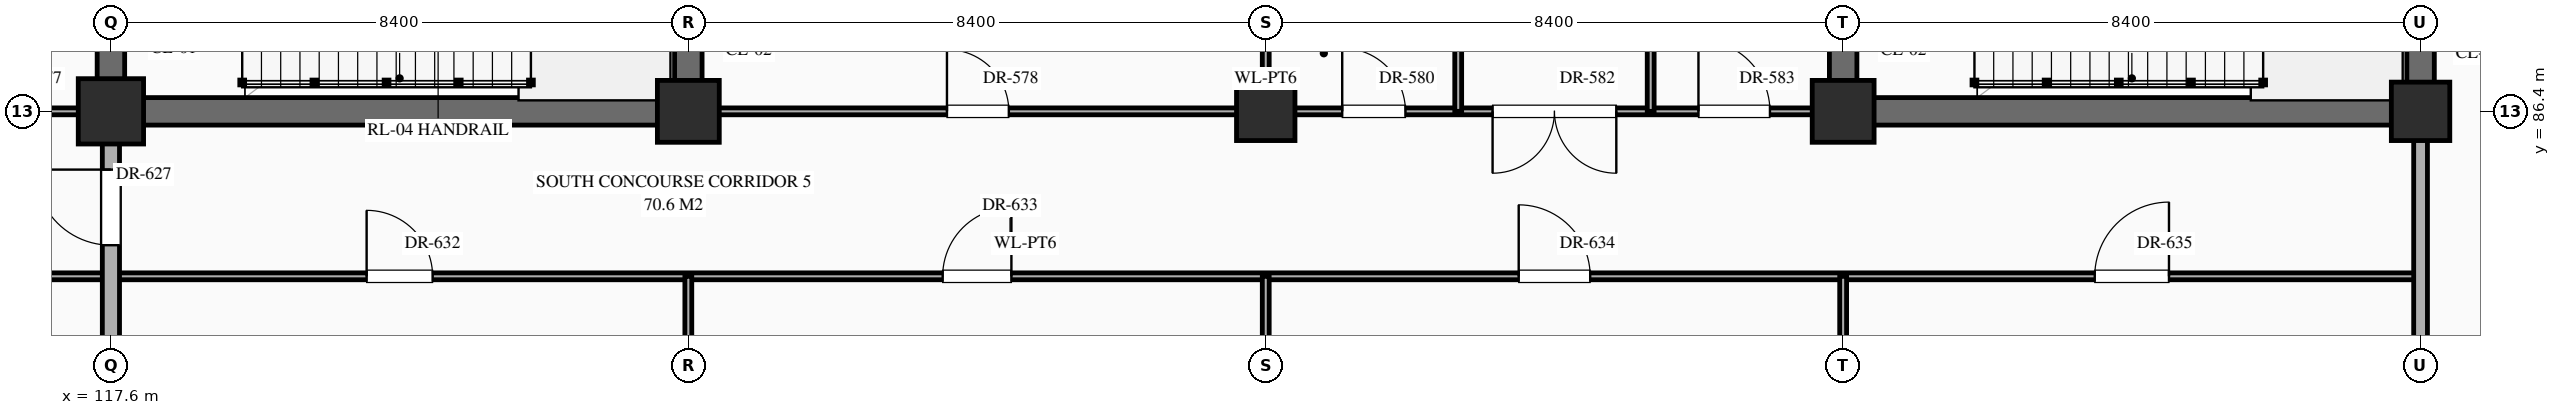
"""IFC4 building model, lengths in metres.
Left out: names, types, materials, properties, quantities, classifications, styles, units other than length and angle.
Written with IfcOpenShell. Run it as: python <this file> out.ifc"""

import sys

from ifc_helpers import new_model, si_unit, direction, frame, frame_2d, origin, origin_2d, place, context, subcontext, project, spatial, rectangle, extrude, element, fill, save


model = new_model("IFC4")
c1 = context("Model", 3, precision=1e-05, world=origin(), true_north=direction((0.0, 1.0)))
c2 = subcontext(c1, "Body", "Model", "MODEL_VIEW")
j1 = project(units=[si_unit("LENGTHUNIT", "METRE"), si_unit("PLANEANGLEUNIT", "RADIAN")], contexts=[c1])
p1 = place(None, origin())
s1 = spatial("IfcSite", under=j1, at=p1, CompositionType="ELEMENT")
p2 = place(p1, origin())
s2 = spatial("IfcBuilding", under=s1, at=p2, CompositionType="ELEMENT")
p3 = place(p2, frame((0.0, 0.0, -5.4)))
s3 = spatial("IfcBuildingStorey", under=s2, at=p3, CompositionType="ELEMENT", Elevation=-5.4)
p4 = place(p3, frame((117.6, 86.4, 0.0), z_axis=(0.0, 0.0, 1.0), x_axis=(1.0, 0.0, 0.0)))
e1 = element("IfcColumn", 1, at=p4, inside=s3, PredefinedType="COLUMN", context=c2, shape_type="SweptSolid", body=[
    extrude(rectangle(XDim=0.95, YDim=0.95, at=origin_2d()), origin(), (0.0, 0.0, 1.0), 5.4),
])
p5 = place(p3, frame((126.0, 86.4, 0.0), z_axis=(0.0, 0.0, 1.0), x_axis=(1.0, 0.0, 0.0)))
e2 = element("IfcColumn", 2, at=p5, inside=s3, PredefinedType="COLUMN", context=c2, shape_type="SweptSolid", body=[
    extrude(rectangle(XDim=0.9, YDim=0.9, at=origin_2d()), origin(), (0.0, 0.0, 1.0), 5.4),
])
p6 = place(p3, frame((134.4, 86.4, 0.0), z_axis=(0.0, 0.0, 1.0), x_axis=(1.0, 0.0, 0.0)))
e3 = element("IfcColumn", 3, at=p6, inside=s3, PredefinedType="COLUMN", context=c2, shape_type="SweptSolid", body=[
    extrude(rectangle(XDim=0.85, YDim=0.85, at=origin_2d()), origin(), (0.0, 0.0, 1.0), 5.4),
])
p7 = place(p3, frame((142.8, 86.4, 0.0), z_axis=(0.0, 0.0, 1.0), x_axis=(1.0, 0.0, 0.0)))
e4 = element("IfcColumn", 4, at=p7, inside=s3, PredefinedType="COLUMN", context=c2, shape_type="SweptSolid", body=[
    extrude(rectangle(XDim=0.9, YDim=0.9, at=origin_2d()), origin(), (0.0, 0.0, 1.0), 5.4),
])
p8 = place(p3, frame((151.2, 86.4, 0.0), z_axis=(0.0, 0.0, 1.0), x_axis=(1.0, 0.0, 0.0)))
e5 = element("IfcColumn", 5, at=p8, inside=s3, PredefinedType="COLUMN", context=c2, shape_type="SweptSolid", body=[
    extrude(rectangle(XDim=0.85, YDim=0.85, at=origin_2d()), origin(), (0.0, 0.0, 1.0), 5.4),
])
p9 = place(p3, frame((33.6, 84.0, 0.0), z_axis=(0.0, 0.0, 1.0), x_axis=(1.0, 0.0, 0.0)))
e6 = element("IfcWall", 6, at=p9, inside=s3, PredefinedType="STANDARD", context=c2, shape_type="SweptSolid", body=[
    extrude(rectangle(XDim=117.6, YDim=0.1, at=frame_2d((58.8, 0.0))), origin(), (0.0, 0.0, 1.0), 5.1),
])
p10 = place(p9, frame((3.66, 0.0, 0.0)))
e7 = element("IfcOpeningElement", 7, at=p10, cuts=e6, PredefinedType="OPENING", context=c2, shape_type="SweptSolid", body=[
    extrude(rectangle(XDim=1.08, YDim=2.25, at=frame_2d((0.54, 1.125))), frame((0.0, 0.062, 0.0), z_axis=(0.0, -1.0, 0.0), x_axis=(1.0, 0.0, 0.0)), (0.0, 0.0, 1.0), 0.124),
])
p11 = place(p9, frame((12.04, 0.0, 0.0)))
e8 = element("IfcOpeningElement", 8, at=p11, cuts=e6, PredefinedType="OPENING", context=c2, shape_type="SweptSolid", body=[
    extrude(rectangle(XDim=1.12, YDim=2.25, at=frame_2d((0.56, 1.125))), frame((0.0, 0.062, 0.0), z_axis=(0.0, -1.0, 0.0), x_axis=(1.0, 0.0, 0.0)), (0.0, 0.0, 1.0), 0.124),
])
p12 = place(p9, frame((20.4, 0.0, 0.0)))
e9 = element("IfcOpeningElement", 9, at=p12, cuts=e6, PredefinedType="OPENING", context=c2, shape_type="SweptSolid", body=[
    extrude(rectangle(XDim=1.2, YDim=2.35, at=frame_2d((0.6, 1.175))), frame((0.0, 0.062, 0.0), z_axis=(0.0, -1.0, 0.0), x_axis=(1.0, 0.0, 0.0)), (0.0, 0.0, 1.0), 0.124),
])
p13 = place(p9, frame((28.78, 0.0, 0.0)))
e10 = element("IfcOpeningElement", 10, at=p13, cuts=e6, PredefinedType="OPENING", context=c2, shape_type="SweptSolid", body=[
    extrude(rectangle(XDim=1.24, YDim=2.3, at=frame_2d((0.62, 1.15))), frame((0.0, 0.062, 0.0), z_axis=(0.0, -1.0, 0.0), x_axis=(1.0, 0.0, 0.0)), (0.0, 0.0, 1.0), 0.124),
])
p14 = place(p9, frame((37.16, 0.0, 0.0)))
e11 = element("IfcOpeningElement", 11, at=p14, cuts=e6, PredefinedType="OPENING", context=c2, shape_type="SweptSolid", body=[
    extrude(rectangle(XDim=1.28, YDim=2.35, at=frame_2d((0.64, 1.175))), frame((0.0, 0.062, 0.0), z_axis=(0.0, -1.0, 0.0), x_axis=(1.0, 0.0, 0.0)), (0.0, 0.0, 1.0), 0.124),
])
p15 = place(p9, frame((42.93, 0.0, 0.0)))
e12 = element("IfcOpeningElement", 12, at=p15, cuts=e6, PredefinedType="OPENING", context=c2, shape_type="SweptSolid", body=[
    extrude(rectangle(XDim=0.94, YDim=2.3, at=frame_2d((0.47, 1.15))), frame((0.0, 0.062, 0.0), z_axis=(0.0, -1.0, 0.0), x_axis=(1.0, 0.0, 0.0)), (0.0, 0.0, 1.0), 0.124),
])
p16 = place(p9, frame((45.71, 0.0, 0.0)))
e13 = element("IfcOpeningElement", 13, at=p16, cuts=e6, PredefinedType="OPENING", context=c2, shape_type="SweptSolid", body=[
    extrude(rectangle(XDim=0.98, YDim=2.35, at=frame_2d((0.49, 1.175))), frame((0.0, 0.062, 0.0), z_axis=(0.0, -1.0, 0.0), x_axis=(1.0, 0.0, 0.0)), (0.0, 0.0, 1.0), 0.124),
])
p17 = place(p9, frame((48.49, 0.0, 0.0)))
e14 = element("IfcOpeningElement", 14, at=p17, cuts=e6, PredefinedType="OPENING", context=c2, shape_type="SweptSolid", body=[
    extrude(rectangle(XDim=1.02, YDim=2.4, at=frame_2d((0.51, 1.2))), frame((0.0, 0.062, 0.0), z_axis=(0.0, -1.0, 0.0), x_axis=(1.0, 0.0, 0.0)), (0.0, 0.0, 1.0), 0.124),
])
p18 = place(p9, frame((54.03, 0.0, 0.0)))
e15 = element("IfcOpeningElement", 15, at=p18, cuts=e6, PredefinedType="OPENING", context=c2, shape_type="SweptSolid", body=[
    extrude(rectangle(XDim=1.14, YDim=2.4, at=frame_2d((0.57, 1.2))), frame((0.0, 0.062, 0.0), z_axis=(0.0, -1.0, 0.0), x_axis=(1.0, 0.0, 0.0)), (0.0, 0.0, 1.0), 0.124),
])
p19 = place(p9, frame((62.55, 0.0, 0.0)))
e16 = element("IfcOpeningElement", 16, at=p19, cuts=e6, PredefinedType="OPENING", context=c2, shape_type="SweptSolid", body=[
    extrude(rectangle(XDim=0.9, YDim=2.15, at=frame_2d((0.45, 1.075))), frame((0.0, 0.062, 0.0), z_axis=(0.0, -1.0, 0.0), x_axis=(1.0, 0.0, 0.0)), (0.0, 0.0, 1.0), 0.124),
])
p20 = place(p9, frame((70.97, 0.0, 0.0)))
e17 = element("IfcOpeningElement", 17, at=p20, cuts=e6, PredefinedType="OPENING", context=c2, shape_type="SweptSolid", body=[
    extrude(rectangle(XDim=0.86, YDim=2.1, at=frame_2d((0.43, 1.05))), frame((0.0, 0.062, 0.0), z_axis=(0.0, -1.0, 0.0), x_axis=(1.0, 0.0, 0.0)), (0.0, 0.0, 1.0), 0.124),
])
p21 = place(p9, frame((79.34, 0.0, 0.0)))
e18 = element("IfcOpeningElement", 18, at=p21, cuts=e6, PredefinedType="OPENING", context=c2, shape_type="SweptSolid", body=[
    extrude(rectangle(XDim=0.92, YDim=2.15, at=frame_2d((0.46, 1.075))), frame((0.0, 0.062, 0.0), z_axis=(0.0, -1.0, 0.0), x_axis=(1.0, 0.0, 0.0)), (0.0, 0.0, 1.0), 0.124),
])
p22 = place(p9, frame((87.72, 0.0, 0.0)))
e19 = element("IfcOpeningElement", 19, at=p22, cuts=e6, PredefinedType="OPENING", context=c2, shape_type="SweptSolid", body=[
    extrude(rectangle(XDim=0.96, YDim=2.2, at=frame_2d((0.48, 1.1))), frame((0.0, 0.062, 0.0), z_axis=(0.0, -1.0, 0.0), x_axis=(1.0, 0.0, 0.0)), (0.0, 0.0, 1.0), 0.124),
])
p23 = place(p9, frame((96.1, 0.0, 0.0)))
e20 = element("IfcOpeningElement", 20, at=p23, cuts=e6, PredefinedType="OPENING", context=c2, shape_type="SweptSolid", body=[
    extrude(rectangle(XDim=1.0, YDim=2.25, at=frame_2d((0.5, 1.125))), frame((0.0, 0.062, 0.0), z_axis=(0.0, -1.0, 0.0), x_axis=(1.0, 0.0, 0.0)), (0.0, 0.0, 1.0), 0.124),
])
p24 = place(p9, frame((104.48, 0.0, 0.0)))
e21 = element("IfcOpeningElement", 21, at=p24, cuts=e6, PredefinedType="OPENING", context=c2, shape_type="SweptSolid", body=[
    extrude(rectangle(XDim=1.04, YDim=2.2, at=frame_2d((0.52, 1.1))), frame((0.0, 0.062, 0.0), z_axis=(0.0, -1.0, 0.0), x_axis=(1.0, 0.0, 0.0)), (0.0, 0.0, 1.0), 0.124),
])
p25 = place(p9, frame((112.86, 0.0, 0.0)))
e22 = element("IfcOpeningElement", 22, at=p25, cuts=e6, PredefinedType="OPENING", context=c2, shape_type="SweptSolid", body=[
    extrude(rectangle(XDim=1.08, YDim=2.25, at=frame_2d((0.54, 1.125))), frame((0.0, 0.062, 0.0), z_axis=(0.0, -1.0, 0.0), x_axis=(1.0, 0.0, 0.0)), (0.0, 0.0, 1.0), 0.124),
])
p26 = place(p3, frame((109.2, 86.4, 0.0), z_axis=(0.0, 0.0, 1.0), x_axis=(1.0, 0.0, 0.0)))
e23 = element("IfcWall", 23, at=p26, inside=s3, PredefinedType="STANDARD", context=c2, shape_type="SweptSolid", body=[
    extrude(rectangle(XDim=8.4, YDim=0.1, at=frame_2d((4.2, 0.0))), origin(), (0.0, 0.0, 1.0), 4.25),
])
p27 = place(p26, frame((1.107, 0.0, 0.0)))
e24 = element("IfcOpeningElement", 24, at=p27, cuts=e23, PredefinedType="OPENING", context=c2, shape_type="SweptSolid", body=[
    extrude(rectangle(XDim=0.98, YDim=2.35, at=frame_2d((0.49, 1.175))), frame((0.0, 0.062, 0.0), z_axis=(0.0, -1.0, 0.0), x_axis=(1.0, 0.0, 0.0)), (0.0, 0.0, 1.0), 0.124),
])
p28 = place(p26, frame((3.67, 0.0, 0.0)))
e25 = element("IfcOpeningElement", 25, at=p28, cuts=e23, PredefinedType="OPENING", context=c2, shape_type="SweptSolid", body=[
    extrude(rectangle(XDim=1.06, YDim=2.4, at=frame_2d((0.53, 1.2))), frame((0.0, 0.062, 0.0), z_axis=(0.0, -1.0, 0.0), x_axis=(1.0, 0.0, 0.0)), (0.0, 0.0, 1.0), 0.124),
])
p29 = place(p26, frame((6.232, 0.0, 0.0)))
e26 = element("IfcOpeningElement", 26, at=p29, cuts=e23, PredefinedType="OPENING", context=c2, shape_type="SweptSolid", body=[
    extrude(rectangle(XDim=1.14, YDim=2.4, at=frame_2d((0.57, 1.2))), frame((0.0, 0.062, 0.0), z_axis=(0.0, -1.0, 0.0), x_axis=(1.0, 0.0, 0.0)), (0.0, 0.0, 1.0), 0.124),
])
p30 = place(p3, frame((117.6, 86.4, 0.0), z_axis=(0.0, 0.0, 1.0), x_axis=(1.0, 0.0, 0.0)))
e27 = element("IfcWall", 27, at=p30, inside=s3, PredefinedType="SHEAR", context=c2, shape_type="SweptSolid", body=[
    extrude(rectangle(XDim=8.4, YDim=0.4, at=frame_2d((4.2, 0.0))), origin(), (0.0, 0.0, 1.0), 5.1),
])
p31 = place(p3, frame((126.0, 86.4, 0.0), z_axis=(0.0, 0.0, 1.0), x_axis=(1.0, 0.0, 0.0)))
e28 = element("IfcWall", 28, at=p31, inside=s3, PredefinedType="STANDARD", context=c2, shape_type="SweptSolid", body=[
    extrude(rectangle(XDim=16.8, YDim=0.1, at=frame_2d((8.4, 0.0))), origin(), (0.0, 0.0, 1.0), 4.25),
])
p32 = place(p31, frame((3.762, 0.0, 0.0)))
e29 = element("IfcOpeningElement", 29, at=p32, cuts=e28, PredefinedType="OPENING", context=c2, shape_type="SweptSolid", body=[
    extrude(rectangle(XDim=0.9, YDim=2.15, at=frame_2d((0.45, 1.075))), frame((0.0, 0.062, 0.0), z_axis=(0.0, -1.0, 0.0), x_axis=(1.0, 0.0, 0.0)), (0.0, 0.0, 1.0), 0.124),
])
p33 = place(p31, frame((9.512, 0.0, 0.0)))
e30 = element("IfcOpeningElement", 30, at=p33, cuts=e28, PredefinedType="OPENING", context=c2, shape_type="SweptSolid", body=[
    extrude(rectangle(XDim=0.92, YDim=2.15, at=frame_2d((0.46, 1.075))), frame((0.0, 0.062, 0.0), z_axis=(0.0, -1.0, 0.0), x_axis=(1.0, 0.0, 0.0)), (0.0, 0.0, 1.0), 0.124),
])
p34 = place(p31, frame((11.7, 0.0, 0.0)))
e31 = element("IfcOpeningElement", 31, at=p34, cuts=e28, PredefinedType="OPENING", context=c2, shape_type="SweptSolid", body=[
    extrude(rectangle(XDim=1.8, YDim=2.5, at=frame_2d((0.9, 1.25))), frame((0.0, 0.062, 0.0), z_axis=(0.0, -1.0, 0.0), x_axis=(1.0, 0.0, 0.0)), (0.0, 0.0, 1.0), 0.124),
])
p35 = place(p31, frame((14.695, 0.0, 0.0)))
e32 = element("IfcOpeningElement", 32, at=p35, cuts=e28, PredefinedType="OPENING", context=c2, shape_type="SweptSolid", body=[
    extrude(rectangle(XDim=1.04, YDim=2.2, at=frame_2d((0.52, 1.1))), frame((0.0, 0.062, 0.0), z_axis=(0.0, -1.0, 0.0), x_axis=(1.0, 0.0, 0.0)), (0.0, 0.0, 1.0), 0.124),
])
p36 = place(p3, frame((142.8, 86.4, 0.0), z_axis=(0.0, 0.0, 1.0), x_axis=(1.0, 0.0, 0.0)))
e33 = element("IfcWall", 33, at=p36, inside=s3, PredefinedType="SHEAR", context=c2, shape_type="SweptSolid", body=[
    extrude(rectangle(XDim=8.4, YDim=0.4, at=frame_2d((4.2, 0.0))), origin(), (0.0, 0.0, 1.0), 5.1),
])
p37 = place(p3, frame((117.6, 79.2, 0.0), z_axis=(0.0, 0.0, 1.0), x_axis=(0.0, 1.0, 0.0)))
e34 = element("IfcWall", 34, at=p37, inside=s3, PredefinedType="STANDARD", context=c2, shape_type="SweptSolid", body=[
    extrude(rectangle(XDim=7.2, YDim=0.25, at=frame_2d((3.6, 0.0))), origin(), (0.0, 0.0, 1.0), 4.35),
])
p38 = place(p37, frame((5.252, 0.0, 0.0)))
e35 = element("IfcOpeningElement", 35, at=p38, cuts=e34, PredefinedType="OPENING", context=c2, shape_type="SweptSolid", body=[
    extrude(rectangle(XDim=1.1, YDim=2.2, at=frame_2d((0.55, 1.1))), frame((0.0, 0.137, 0.0), z_axis=(0.0, -1.0, 0.0), x_axis=(1.0, 0.0, 0.0)), (0.0, 0.0, 1.0), 0.274),
])
p39 = place(p3, frame((117.6, 86.4, 0.0), z_axis=(0.0, 0.0, 1.0), x_axis=(0.0, 1.0, 0.0)))
e36 = element("IfcWall", 36, at=p39, inside=s3, PredefinedType="SHEAR", context=c2, shape_type="SweptSolid", body=[
    extrude(rectangle(XDim=4.8, YDim=0.4, at=frame_2d((2.4, 0.0))), origin(), (0.0, 0.0, 1.0), 5.1),
])
p40 = place(p3, frame((126.0, 79.2, 0.0), z_axis=(0.0, 0.0, 1.0), x_axis=(0.0, 1.0, 0.0)))
e37 = element("IfcWall", 37, at=p40, inside=s3, PredefinedType="STANDARD", context=c2, shape_type="SweptSolid", body=[
    extrude(rectangle(XDim=4.8, YDim=0.1, at=frame_2d((2.4, 0.0))), origin(), (0.0, 0.0, 1.0), 4.35),
])
p41 = place(p3, frame((126.0, 86.4, 0.0), z_axis=(0.0, 0.0, 1.0), x_axis=(0.0, 1.0, 0.0)))
e38 = element("IfcWall", 38, at=p41, inside=s3, PredefinedType="SHEAR", context=c2, shape_type="SweptSolid", body=[
    extrude(rectangle(XDim=4.8, YDim=0.4, at=frame_2d((2.4, 0.0))), origin(), (0.0, 0.0, 1.0), 5.1),
])
p42 = place(p3, frame((134.4, 79.2, 0.0), z_axis=(0.0, 0.0, 1.0), x_axis=(0.0, 1.0, 0.0)))
e39 = element("IfcWall", 39, at=p42, inside=s3, PredefinedType="STANDARD", context=c2, shape_type="SweptSolid", body=[
    extrude(rectangle(XDim=4.8, YDim=0.1, at=frame_2d((2.4, 0.0))), origin(), (0.0, 0.0, 1.0), 4.35),
])
p43 = place(p3, frame((134.4, 86.4, 0.0), z_axis=(0.0, 0.0, 1.0), x_axis=(0.0, 1.0, 0.0)))
e40 = element("IfcWall", 40, at=p43, inside=s3, PredefinedType="STANDARD", context=c2, shape_type="SweptSolid", body=[
    extrude(rectangle(XDim=7.2, YDim=0.1, at=frame_2d((3.6, 0.0))), origin(), (0.0, 0.0, 1.0), 4.35),
])
p44 = place(p3, frame((137.2, 86.4, 0.0), z_axis=(0.0, 0.0, 1.0), x_axis=(0.0, 1.0, 0.0)))
e41 = element("IfcWall", 41, at=p44, inside=s3, PredefinedType="STANDARD", context=c2, shape_type="SweptSolid", body=[
    extrude(rectangle(XDim=7.2, YDim=0.1, at=frame_2d((3.6, 0.0))), origin(), (0.0, 0.0, 1.0), 5.1),
])
p45 = place(p44, frame((3.17, 0.0, 0.0)))
e42 = element("IfcOpeningElement", 42, at=p45, cuts=e41, PredefinedType="OPENING", context=c2, shape_type="SweptSolid", body=[
    extrude(rectangle(XDim=0.86, YDim=2.1, at=frame_2d((0.43, 1.05))), frame((0.0, 0.062, 0.0), z_axis=(0.0, -1.0, 0.0), x_axis=(1.0, 0.0, 0.0)), (0.0, 0.0, 1.0), 0.124),
])
p46 = place(p3, frame((140.0, 86.4, 0.0), z_axis=(0.0, 0.0, 1.0), x_axis=(0.0, 1.0, 0.0)))
e43 = element("IfcWall", 43, at=p46, inside=s3, PredefinedType="STANDARD", context=c2, shape_type="SweptSolid", body=[
    extrude(rectangle(XDim=7.2, YDim=0.1, at=frame_2d((3.6, 0.0))), origin(), (0.0, 0.0, 1.0), 5.1),
])
p47 = place(p46, frame((3.12, 0.0, 0.0)))
e44 = element("IfcOpeningElement", 44, at=p47, cuts=e43, PredefinedType="OPENING", context=c2, shape_type="SweptSolid", body=[
    extrude(rectangle(XDim=0.96, YDim=2.2, at=frame_2d((0.48, 1.1))), frame((0.0, 0.062, 0.0), z_axis=(0.0, -1.0, 0.0), x_axis=(1.0, 0.0, 0.0)), (0.0, 0.0, 1.0), 0.124),
])
p48 = place(p3, frame((142.8, 79.2, 0.0), z_axis=(0.0, 0.0, 1.0), x_axis=(0.0, 1.0, 0.0)))
e45 = element("IfcWall", 45, at=p48, inside=s3, PredefinedType="STANDARD", context=c2, shape_type="SweptSolid", body=[
    extrude(rectangle(XDim=4.8, YDim=0.1, at=frame_2d((2.4, 0.0))), origin(), (0.0, 0.0, 1.0), 4.35),
])
p49 = place(p3, frame((142.8, 86.4, 0.0), z_axis=(0.0, 0.0, 1.0), x_axis=(0.0, 1.0, 0.0)))
e46 = element("IfcWall", 46, at=p49, inside=s3, PredefinedType="SHEAR", context=c2, shape_type="SweptSolid", body=[
    extrude(rectangle(XDim=4.8, YDim=0.4, at=frame_2d((2.4, 0.0))), origin(), (0.0, 0.0, 1.0), 5.1),
])
p50 = place(p3, frame((151.2, 64.8, 0.0), z_axis=(0.0, 0.0, 1.0), x_axis=(0.0, 1.0, 0.0)))
e47 = element("IfcWall", 47, at=p50, inside=s3, PredefinedType="STANDARD", context=c2, shape_type="SweptSolid", body=[
    extrude(rectangle(XDim=21.6, YDim=0.2, at=frame_2d((10.8, 0.0))), origin(), (0.0, 0.0, 1.0), 4.23),
])
p51 = place(p3, frame((151.2, 86.4, 0.0), z_axis=(0.0, 0.0, 1.0), x_axis=(0.0, 1.0, 0.0)))
e48 = element("IfcWall", 48, at=p51, inside=s3, PredefinedType="SHEAR", context=c2, shape_type="SweptSolid", body=[
    extrude(rectangle(XDim=4.8, YDim=0.4, at=frame_2d((2.4, 0.0))), origin(), (0.0, 0.0, 1.0), 5.1),
])
p52 = place(p32, origin())
e49 = element("IfcDoor", 49, at=p52, inside=s3, OperationType="SINGLE_SWING_LEFT", PredefinedType="DOOR", context=c2, shape_type="SweptSolid", body=[
    extrude(rectangle(XDim=0.9, YDim=2.15, at=frame_2d((0.45, 1.075))), frame((0.0, 0.025, 0.0), z_axis=(0.0, -1.0, 0.0), x_axis=(1.0, 0.0, 0.0)), (0.0, 0.0, 1.0), 0.05),
])
fill(e29, e49)
p53 = place(p33, origin())
e50 = element("IfcDoor", 50, at=p53, inside=s3, OperationType="SINGLE_SWING_LEFT", PredefinedType="DOOR", context=c2, shape_type="SweptSolid", body=[
    extrude(rectangle(XDim=0.92, YDim=2.15, at=frame_2d((0.46, 1.075))), frame((0.0, 0.025, 0.0), z_axis=(0.0, -1.0, 0.0), x_axis=(1.0, 0.0, 0.0)), (0.0, 0.0, 1.0), 0.05),
])
fill(e30, e50)
p54 = place(p34, frame((1.8, 0.0, 0.0), z_axis=(0.0, 0.0, 1.0), x_axis=(-1.0, 0.0, 0.0)))
e51 = element("IfcDoor", 51, at=p54, inside=s3, OperationType="DOUBLE_DOOR_SINGLE_SWING", PredefinedType="DOOR", context=c2, shape_type="SweptSolid", body=[
    extrude(rectangle(XDim=1.8, YDim=2.5, at=frame_2d((0.9, 1.25))), frame((0.0, 0.025, 0.0), z_axis=(0.0, -1.0, 0.0), x_axis=(1.0, 0.0, 0.0)), (0.0, 0.0, 1.0), 0.05),
])
fill(e31, e51)
p55 = place(p35, origin())
e52 = element("IfcDoor", 52, at=p55, inside=s3, OperationType="SINGLE_SWING_LEFT", PredefinedType="DOOR", context=c2, shape_type="SweptSolid", body=[
    extrude(rectangle(XDim=1.04, YDim=2.2, at=frame_2d((0.52, 1.1))), frame((0.0, 0.025, 0.0), z_axis=(0.0, -1.0, 0.0), x_axis=(1.0, 0.0, 0.0)), (0.0, 0.0, 1.0), 0.05),
])
fill(e32, e52)
p56 = place(p38, origin())
e53 = element("IfcDoor", 53, at=p56, inside=s3, OperationType="SINGLE_SWING_RIGHT", PredefinedType="DOOR", context=c2, shape_type="SweptSolid", body=[
    extrude(rectangle(XDim=1.1, YDim=2.2, at=frame_2d((0.55, 1.1))), frame((0.0, 0.025, 0.0), z_axis=(0.0, -1.0, 0.0), x_axis=(1.0, 0.0, 0.0)), (0.0, 0.0, 1.0), 0.05),
])
fill(e35, e53)
p57 = place(p22, origin())
e54 = element("IfcDoor", 54, at=p57, inside=s3, OperationType="SINGLE_SWING_LEFT", PredefinedType="DOOR", context=c2, shape_type="SweptSolid", body=[
    extrude(rectangle(XDim=0.96, YDim=2.2, at=frame_2d((0.48, 1.1))), frame((0.0, 0.025, 0.0), z_axis=(0.0, -1.0, 0.0), x_axis=(1.0, 0.0, 0.0)), (0.0, 0.0, 1.0), 0.05),
])
fill(e19, e54)
p58 = place(p23, origin())
e55 = element("IfcDoor", 55, at=p58, inside=s3, OperationType="SINGLE_SWING_RIGHT", PredefinedType="DOOR", context=c2, shape_type="SweptSolid", body=[
    extrude(rectangle(XDim=1.0, YDim=2.25, at=frame_2d((0.5, 1.125))), frame((0.0, 0.025, 0.0), z_axis=(0.0, -1.0, 0.0), x_axis=(1.0, 0.0, 0.0)), (0.0, 0.0, 1.0), 0.05),
])
fill(e20, e55)
p59 = place(p24, origin())
e56 = element("IfcDoor", 56, at=p59, inside=s3, OperationType="SINGLE_SWING_LEFT", PredefinedType="DOOR", context=c2, shape_type="SweptSolid", body=[
    extrude(rectangle(XDim=1.04, YDim=2.2, at=frame_2d((0.52, 1.1))), frame((0.0, 0.025, 0.0), z_axis=(0.0, -1.0, 0.0), x_axis=(1.0, 0.0, 0.0)), (0.0, 0.0, 1.0), 0.05),
])
fill(e21, e56)
p60 = place(p25, origin())
e57 = element("IfcDoor", 57, at=p60, inside=s3, OperationType="SINGLE_SWING_RIGHT", PredefinedType="DOOR", context=c2, shape_type="SweptSolid", body=[
    extrude(rectangle(XDim=1.08, YDim=2.25, at=frame_2d((0.54, 1.125))), frame((0.0, 0.025, 0.0), z_axis=(0.0, -1.0, 0.0), x_axis=(1.0, 0.0, 0.0)), (0.0, 0.0, 1.0), 0.05),
])
fill(e22, e57)
save(model, sys.argv[1])
